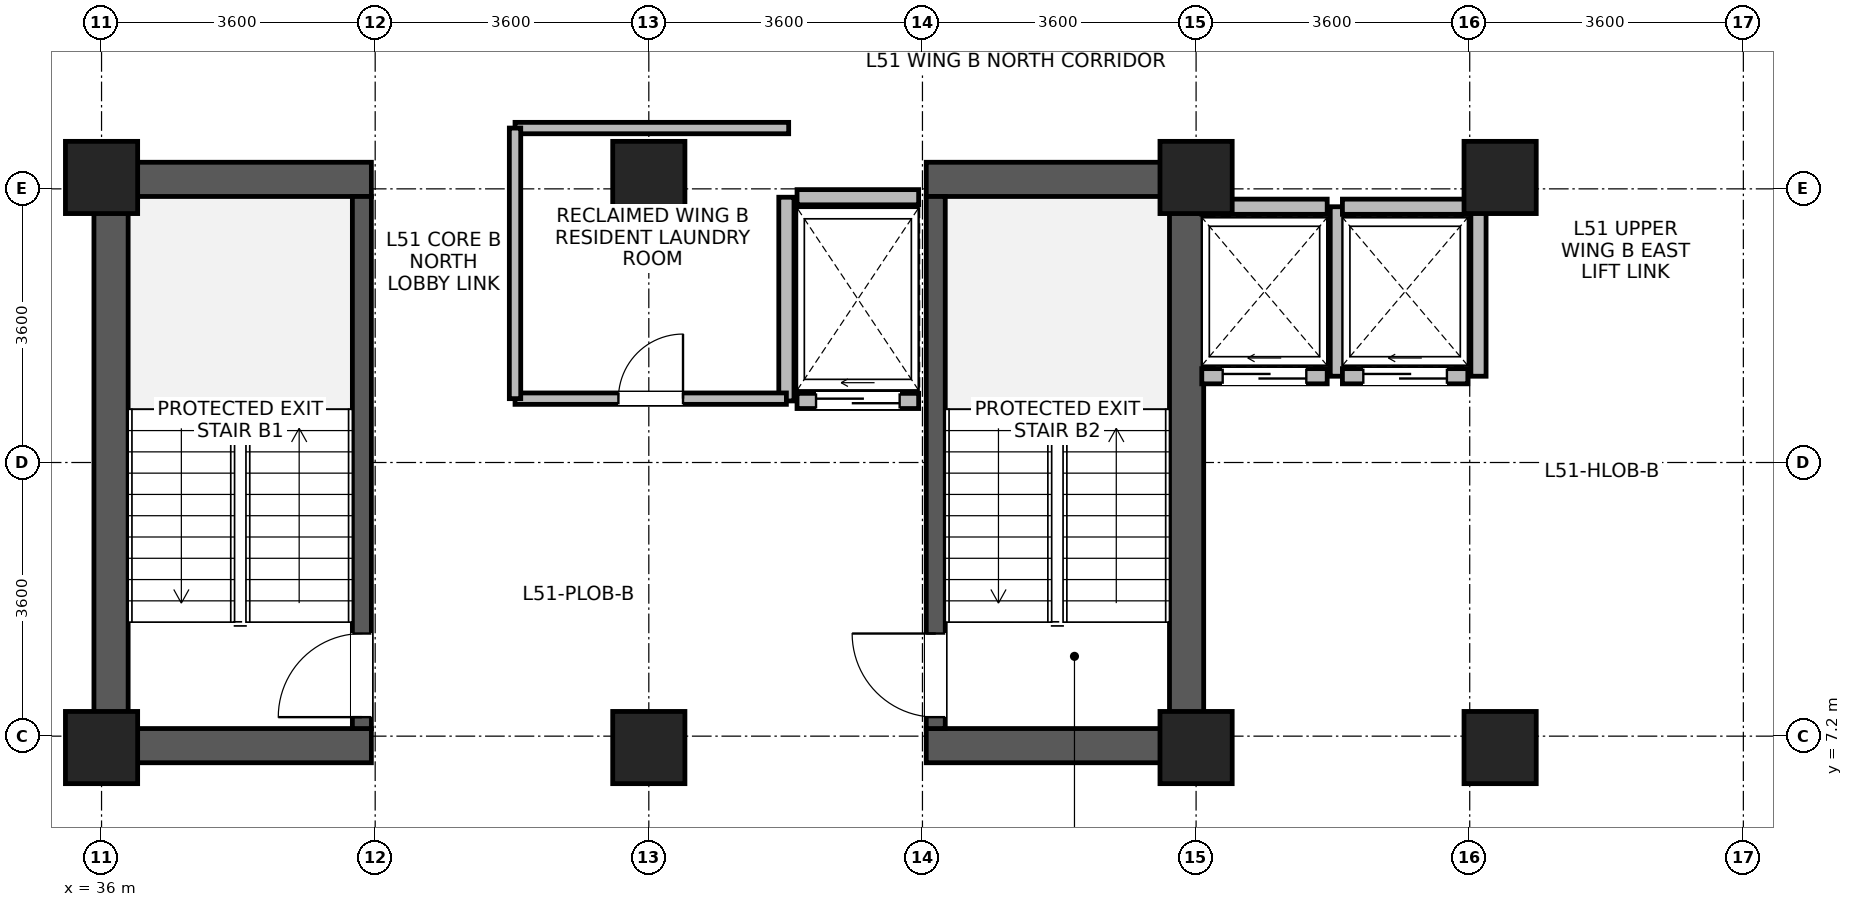
"""IFC4 building model, lengths in metres.
Left out: names, types, materials, properties, quantities, classifications, styles, units other than length and angle.
Written with IfcOpenShell. Run it as: python <this file> out.ifc"""

import sys

from ifc_helpers import new_model, si_unit, direction, frame, frame_2d, origin, origin_2d, place, context, subcontext, project, spatial, rectangle, extrude, source, transform, mapped, element, fill, save


model = new_model("IFC4")
c1 = context("Model", 3, precision=1e-05, world=origin(), true_north=direction((0.0, 1.0)))
c2 = subcontext(c1, "Body", "Model", "MODEL_VIEW")
j1 = project(units=[si_unit("LENGTHUNIT", "METRE"), si_unit("PLANEANGLEUNIT", "RADIAN")], contexts=[c1])
p1 = place(None, origin())
s1 = spatial("IfcSite", under=j1, at=p1, CompositionType="ELEMENT")
p2 = place(p1, origin())
s2 = spatial("IfcBuilding", under=s1, at=p2, CompositionType="ELEMENT")
p3 = place(p2, frame((0.0, 0.0, 201.8)))
s3 = spatial("IfcBuildingStorey", under=s2, at=p3, CompositionType="ELEMENT", Elevation=201.8)
for number, where, z_axis, x_axis in (
    (1, (36.125, 6.85, 0.0), (0.0, 0.0, 1.0), (0.0, 1.0, 0.0)),
    (2, (50.275, 6.85, 0.0), (0.0, 0.0, 1.0), (0.0, 1.0, 0.0)),
):
    element("IfcWall", number, at=place(p3, frame(where, z_axis=z_axis, x_axis=x_axis)), inside=s3, PredefinedType="SHEAR", context=c2, shape_type="SweptSolid", body=[
        extrude(rectangle(XDim=7.9, YDim=0.45, at=frame_2d((3.95, 0.0))), origin(), (0.0, 0.0, 1.0), 3.47),
    ])
for number, where, z_axis, x_axis in (
    (3, (36.35, 7.075, 0.0), (0.0, 0.0, 1.0), (1.0, 0.0, 0.0)),
    (4, (46.85, 7.075, 0.0), (0.0, 0.0, 1.0), (1.0, 0.0, 0.0)),
    (5, (36.35, 14.525, 0.0), (0.0, 0.0, 1.0), (1.0, 0.0, 0.0)),
    (6, (46.85, 14.525, 0.0), (0.0, 0.0, 1.0), (1.0, 0.0, 0.0)),
):
    element("IfcWall", number, at=place(p3, frame(where, z_axis=z_axis, x_axis=x_axis)), inside=s3, PredefinedType="SHEAR", context=c2, shape_type="SweptSolid", body=[
        extrude(rectangle(XDim=3.2, YDim=0.45, at=frame_2d((1.6, 0.0))), origin(), (0.0, 0.0, 1.0), 3.47),
    ])
p4 = place(p3, frame((39.425, 7.3, 0.0), z_axis=(0.0, 0.0, 1.0), x_axis=(0.0, 1.0, 0.0)))
e7 = element("IfcWall", 7, at=p4, inside=s3, PredefinedType="SHEAR", context=c2, shape_type="SweptSolid", body=[
    extrude(rectangle(XDim=7.0, YDim=0.25, at=frame_2d((3.5, 0.0))), origin(), (0.0, 0.0, 1.0), 3.47),
])
p5 = place(p4, frame((0.15, 0.0, 0.0)))
e8 = element("IfcOpeningElement", 8, at=p5, cuts=e7, PredefinedType="OPENING", context=c2, shape_type="SweptSolid", body=[
    extrude(rectangle(XDim=1.1, YDim=2.08, at=frame_2d((0.55, 1.04))), frame((0.0, 0.135, 0.0), z_axis=(0.0, -1.0, 0.0), x_axis=(1.0, 0.0, 0.0)), (0.0, 0.0, 1.0), 0.27),
])
p6 = place(p3, frame((46.975, 7.3, 0.0), z_axis=(0.0, 0.0, 1.0), x_axis=(0.0, 1.0, 0.0)))
e9 = element("IfcWall", 9, at=p6, inside=s3, PredefinedType="SHEAR", context=c2, shape_type="SweptSolid", body=[
    extrude(rectangle(XDim=7.0, YDim=0.25, at=frame_2d((3.5, 0.0))), origin(), (0.0, 0.0, 1.0), 3.47),
])
p7 = place(p6, frame((0.15, 0.0, 0.0)))
e10 = element("IfcOpeningElement", 10, at=p7, cuts=e9, PredefinedType="OPENING", context=c2, shape_type="SweptSolid", body=[
    extrude(rectangle(XDim=1.1, YDim=2.08, at=frame_2d((0.55, 1.04))), frame((0.0, 0.135, 0.0), z_axis=(0.0, -1.0, 0.0), x_axis=(1.0, 0.0, 0.0)), (0.0, 0.0, 1.0), 0.27),
])
m1 = source(origin(), c2, "Body", "SweptSolid", [
    extrude(rectangle(XDim=0.95, YDim=0.95, at=origin_2d()), origin(), (0.0, 0.0, 1.0), 3.7),
])
for number, where, z_axis, x_axis in (
    (11, (36.0, 7.05, 0.0), (0.0, 0.0, 1.0), (1.0, 0.0, 0.0)),
    (12, (36.0, 14.55, 0.0), (0.0, 0.0, 1.0), (1.0, 0.0, 0.0)),
    (13, (43.2, 7.05, 0.0), (0.0, 0.0, 1.0), (1.0, 0.0, 0.0)),
    (14, (43.2, 14.55, 0.0), (0.0, 0.0, 1.0), (1.0, 0.0, 0.0)),
    (15, (50.4, 7.05, 0.0), (0.0, 0.0, 1.0), (1.0, 0.0, 0.0)),
    (16, (50.4, 14.55, 0.0), (0.0, 0.0, 1.0), (1.0, 0.0, 0.0)),
    (17, (54.4, 7.05, 0.0), (0.0, 0.0, 1.0), (1.0, 0.0, 0.0)),
    (18, (54.4, 14.55, 0.0), (0.0, 0.0, 1.0), (1.0, 0.0, 0.0)),
):
    element("IfcColumn", number, at=place(p3, frame(where, z_axis=z_axis, x_axis=x_axis)), inside=s3, PredefinedType="COLUMN", context=c2, shape_type="MappedRepresentation", body=[
        mapped(m1, transform((0.0, 0.0, 0.0), x_axis=(1.0, 0.0, 0.0), y_axis=(0.0, 1.0, 0.0), z_axis=(0.0, 0.0, 1.0), scale=1.0)),
    ])
p8 = place(p3, frame((50.475, 11.935, 0.0), z_axis=(0.0, 0.0, 1.0), x_axis=(1.0, 0.0, 0.0)))
e19 = element("IfcWall", 19, at=p8, inside=s3, PredefinedType="PARTITIONING", context=c2, shape_type="SweptSolid", body=[
    extrude(rectangle(XDim=1.65, YDim=0.2, at=frame_2d((0.825, 0.0))), origin(), (0.0, 0.0, 1.0), 3.45),
])
p9 = place(p8, frame((0.275, 0.0, 0.0)))
e20 = element("IfcOpeningElement", 20, at=p9, cuts=e19, PredefinedType="OPENING", context=c2, shape_type="SweptSolid", body=[
    extrude(rectangle(XDim=1.1, YDim=2.12, at=frame_2d((0.55, 1.06))), frame((0.0, 0.11, 0.0), z_axis=(0.0, -1.0, 0.0), x_axis=(1.0, 0.0, 0.0)), (0.0, 0.0, 1.0), 0.22),
])
p10 = place(p3, frame((50.475, 14.165, 0.0), z_axis=(0.0, 0.0, 1.0), x_axis=(1.0, 0.0, 0.0)))
e21 = element("IfcWall", 21, at=p10, inside=s3, PredefinedType="PARTITIONING", context=c2, shape_type="SweptSolid", body=[
    extrude(rectangle(XDim=1.65, YDim=0.2, at=frame_2d((0.825, 0.0))), origin(), (0.0, 0.0, 1.0), 3.45),
])
p11 = place(p3, frame((52.265, 11.935, 0.0), z_axis=(0.0, 0.0, 1.0), x_axis=(0.0, 1.0, 0.0)))
e22 = element("IfcWall", 22, at=p11, inside=s3, PredefinedType="PARTITIONING", context=c2, shape_type="SweptSolid", body=[
    extrude(rectangle(XDim=2.23, YDim=0.2, at=frame_2d((1.115, 0.0))), origin(), (0.0, 0.0, 1.0), 3.45),
])
p12 = place(p3, frame((52.325, 11.935, 0.0), z_axis=(0.0, 0.0, 1.0), x_axis=(1.0, 0.0, 0.0)))
e23 = element("IfcWall", 23, at=p12, inside=s3, PredefinedType="PARTITIONING", context=c2, shape_type="SweptSolid", body=[
    extrude(rectangle(XDim=1.65, YDim=0.2, at=frame_2d((0.825, 0.0))), origin(), (0.0, 0.0, 1.0), 3.45),
])
p13 = place(p12, frame((0.275, 0.0, 0.0)))
e24 = element("IfcOpeningElement", 24, at=p13, cuts=e23, PredefinedType="OPENING", context=c2, shape_type="SweptSolid", body=[
    extrude(rectangle(XDim=1.1, YDim=2.12, at=frame_2d((0.55, 1.06))), frame((0.0, 0.11, 0.0), z_axis=(0.0, -1.0, 0.0), x_axis=(1.0, 0.0, 0.0)), (0.0, 0.0, 1.0), 0.22),
])
p14 = place(p3, frame((52.325, 14.165, 0.0), z_axis=(0.0, 0.0, 1.0), x_axis=(1.0, 0.0, 0.0)))
e25 = element("IfcWall", 25, at=p14, inside=s3, PredefinedType="PARTITIONING", context=c2, shape_type="SweptSolid", body=[
    extrude(rectangle(XDim=1.65, YDim=0.2, at=frame_2d((0.825, 0.0))), origin(), (0.0, 0.0, 1.0), 3.45),
])
p15 = place(p3, frame((54.115, 11.935, 0.0), z_axis=(0.0, 0.0, 1.0), x_axis=(0.0, 1.0, 0.0)))
e26 = element("IfcWall", 26, at=p15, inside=s3, PredefinedType="PARTITIONING", context=c2, shape_type="SweptSolid", body=[
    extrude(rectangle(XDim=2.23, YDim=0.2, at=frame_2d((1.115, 0.0))), origin(), (0.0, 0.0, 1.0), 3.45),
])
p16 = place(p3, frame((45.15, 11.61, 0.0), z_axis=(0.0, 0.0, 1.0), x_axis=(1.0, 0.0, 0.0)))
e27 = element("IfcWall", 27, at=p16, inside=s3, PredefinedType="PARTITIONING", context=c2, shape_type="SweptSolid", body=[
    extrude(rectangle(XDim=1.6, YDim=0.2, at=frame_2d((0.8, 0.0))), origin(), (0.0, 0.0, 1.0), 3.45),
])
p17 = place(p16, frame((0.25, 0.0, 0.0)))
e28 = element("IfcOpeningElement", 28, at=p17, cuts=e27, PredefinedType="OPENING", context=c2, shape_type="SweptSolid", body=[
    extrude(rectangle(XDim=1.1, YDim=2.12, at=frame_2d((0.55, 1.06))), frame((0.0, 0.11, 0.0), z_axis=(0.0, -1.0, 0.0), x_axis=(1.0, 0.0, 0.0)), (0.0, 0.0, 1.0), 0.22),
])
p18 = place(p3, frame((45.15, 14.29, 0.0), z_axis=(0.0, 0.0, 1.0), x_axis=(1.0, 0.0, 0.0)))
e29 = element("IfcWall", 29, at=p18, inside=s3, PredefinedType="PARTITIONING", context=c2, shape_type="SweptSolid", body=[
    extrude(rectangle(XDim=1.6, YDim=0.2, at=frame_2d((0.8, 0.0))), origin(), (0.0, 0.0, 1.0), 2.45),
])
p19 = place(p3, frame((45.01, 11.61, 0.0), z_axis=(0.0, 0.0, 1.0), x_axis=(0.0, 1.0, 0.0)))
e30 = element("IfcWall", 30, at=p19, inside=s3, PredefinedType="PARTITIONING", context=c2, shape_type="SweptSolid", body=[
    extrude(rectangle(XDim=2.68, YDim=0.2, at=frame_2d((1.34, 0.0))), origin(), (0.0, 0.0, 1.0), 3.45),
])
p20 = place(p3, frame((41.44, 11.64, 0.0), z_axis=(0.0, 0.0, 1.0), x_axis=(1.0, 0.0, 0.0)))
e31 = element("IfcWall", 31, at=p20, inside=s3, PredefinedType="PARTITIONING", context=c2, shape_type="SweptSolid", body=[
    extrude(rectangle(XDim=3.57, YDim=0.15, at=frame_2d((1.785, 0.0))), origin(), (0.0, 0.0, 1.0), 3.45),
])
p21 = place(p20, frame((1.36, 0.0, 0.0)))
e32 = element("IfcOpeningElement", 32, at=p21, cuts=e31, PredefinedType="OPENING", context=c2, shape_type="SweptSolid", body=[
    extrude(rectangle(XDim=0.85, YDim=2.04, at=frame_2d((0.425, 1.02))), frame((0.0, 0.085, 0.0), z_axis=(0.0, -1.0, 0.0), x_axis=(1.0, 0.0, 0.0)), (0.0, 0.0, 1.0), 0.17),
])
p22 = place(p3, frame((41.44, 15.2, 0.0), z_axis=(0.0, 0.0, 1.0), x_axis=(1.0, 0.0, 0.0)))
e33 = element("IfcWall", 33, at=p22, inside=s3, PredefinedType="PARTITIONING", context=c2, shape_type="SweptSolid", body=[
    extrude(rectangle(XDim=3.6, YDim=0.15, at=frame_2d((1.8, 0.0))), origin(), (0.0, 0.0, 1.0), 3.45),
])
p23 = place(p3, frame((41.44, 11.64, 0.0), z_axis=(0.0, 0.0, 1.0), x_axis=(0.0, 1.0, 0.0)))
e34 = element("IfcWall", 34, at=p23, inside=s3, PredefinedType="PARTITIONING", context=c2, shape_type="SweptSolid", body=[
    extrude(rectangle(XDim=3.56, YDim=0.15, at=frame_2d((1.78, 0.0))), origin(), (0.0, 0.0, 1.0), 3.45),
])
p24 = place(p5, origin())
e35 = element("IfcDoor", 35, at=p24, inside=s3, OperationType="SINGLE_SWING_LEFT", PredefinedType="DOOR", context=c2, shape_type="SweptSolid", body=[
    extrude(rectangle(XDim=1.1, YDim=2.08, at=frame_2d((0.55, 1.04))), frame((0.0, 0.025, 0.0), z_axis=(0.0, -1.0, 0.0), x_axis=(1.0, 0.0, 0.0)), (0.0, 0.0, 1.0), 0.05),
])
fill(e8, e35)
p25 = place(p7, origin())
e36 = element("IfcDoor", 36, at=p25, inside=s3, OperationType="SINGLE_SWING_RIGHT", PredefinedType="DOOR", context=c2, shape_type="SweptSolid", body=[
    extrude(rectangle(XDim=1.1, YDim=2.08, at=frame_2d((0.55, 1.04))), frame((0.0, 0.025, 0.0), z_axis=(0.0, -1.0, 0.0), x_axis=(1.0, 0.0, 0.0)), (0.0, 0.0, 1.0), 0.05),
])
fill(e10, e36)
p26 = place(p9, origin())
e37 = element("IfcDoor", 37, at=p26, inside=s3, OperationType="SLIDING_TO_LEFT", PredefinedType="DOOR", context=c2, shape_type="SweptSolid", body=[
    extrude(rectangle(XDim=1.1, YDim=2.12, at=frame_2d((0.55, 1.06))), frame((0.0, 0.025, 0.0), z_axis=(0.0, -1.0, 0.0), x_axis=(1.0, 0.0, 0.0)), (0.0, 0.0, 1.0), 0.05),
])
fill(e20, e37)
p27 = place(p13, origin())
e38 = element("IfcDoor", 38, at=p27, inside=s3, OperationType="SLIDING_TO_LEFT", PredefinedType="DOOR", context=c2, shape_type="SweptSolid", body=[
    extrude(rectangle(XDim=1.1, YDim=2.12, at=frame_2d((0.55, 1.06))), frame((0.0, 0.025, 0.0), z_axis=(0.0, -1.0, 0.0), x_axis=(1.0, 0.0, 0.0)), (0.0, 0.0, 1.0), 0.05),
])
fill(e24, e38)
p28 = place(p17, origin())
e39 = element("IfcDoor", 39, at=p28, inside=s3, OperationType="SLIDING_TO_LEFT", PredefinedType="DOOR", context=c2, shape_type="SweptSolid", body=[
    extrude(rectangle(XDim=1.1, YDim=2.12, at=frame_2d((0.55, 1.06))), frame((0.0, 0.025, 0.0), z_axis=(0.0, -1.0, 0.0), x_axis=(1.0, 0.0, 0.0)), (0.0, 0.0, 1.0), 0.05),
])
fill(e28, e39)
p29 = place(p21, origin())
e40 = element("IfcDoor", 40, at=p29, inside=s3, OperationType="SINGLE_SWING_RIGHT", PredefinedType="DOOR", context=c2, shape_type="SweptSolid", body=[
    extrude(rectangle(XDim=0.85, YDim=2.04, at=frame_2d((0.425, 1.02))), frame((0.0, 0.025, 0.0), z_axis=(0.0, -1.0, 0.0), x_axis=(1.0, 0.0, 0.0)), (0.0, 0.0, 1.0), 0.05),
])
fill(e32, e40)
save(model, sys.argv[1])
